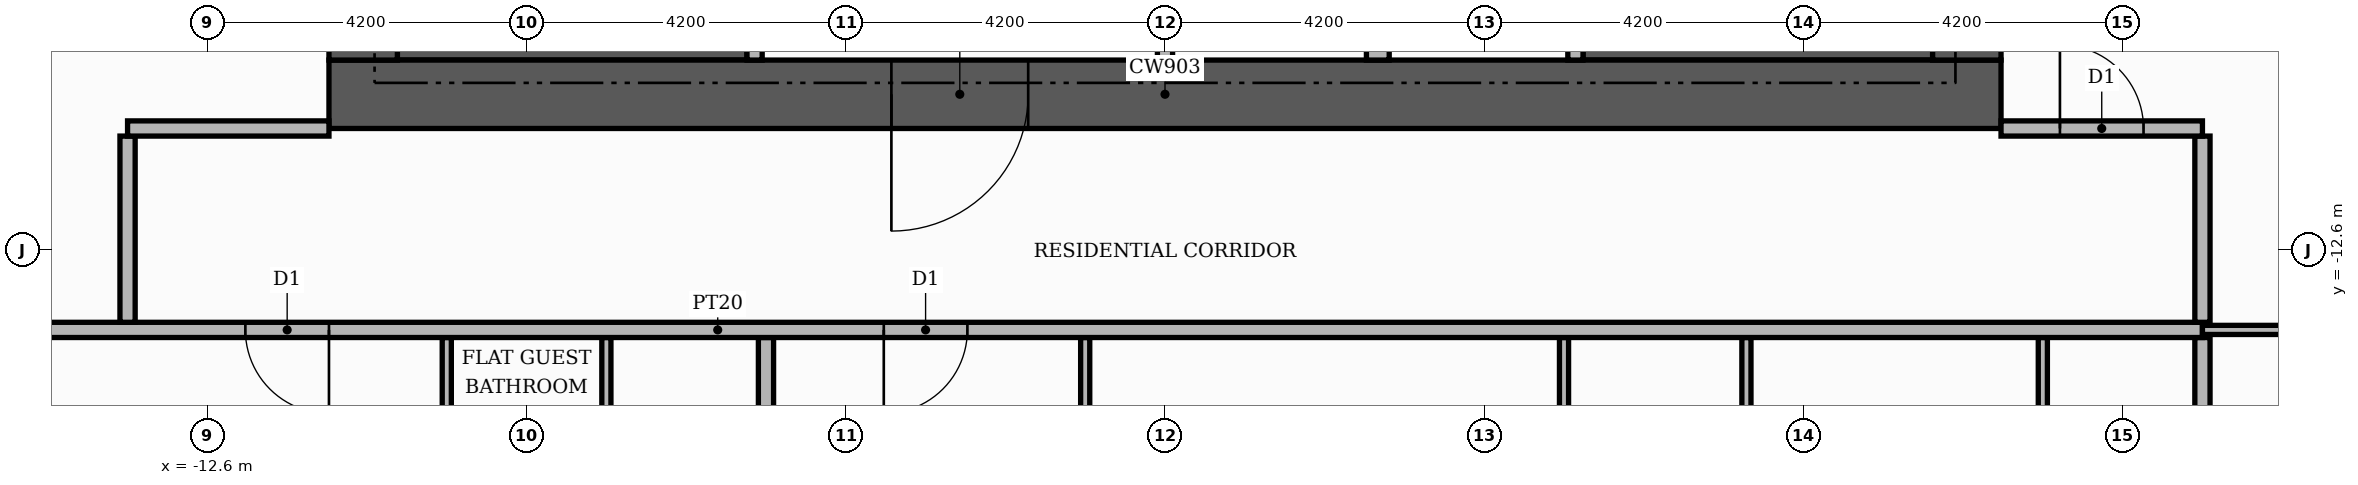
"""IFC4 building model, lengths in metres.
Left out: names, types, materials, properties, quantities, classifications, styles, units other than length and angle.
Written with IfcOpenShell. Run it as: python <this file> out.ifc"""

import sys

from ifc_helpers import new_model, si_unit, direction, frame, frame_2d, origin, place, context, subcontext, project, spatial, rectangle, extrude, element, fill, save


model = new_model("IFC4")
c1 = context("Model", 3, precision=1e-05, world=origin(), true_north=direction((0.0, 1.0)))
c2 = subcontext(c1, "Body", "Model", "MODEL_VIEW")
j1 = project(units=[si_unit("LENGTHUNIT", "METRE"), si_unit("PLANEANGLEUNIT", "RADIAN")], contexts=[c1])
p1 = place(None, origin())
s1 = spatial("IfcSite", under=j1, at=p1, CompositionType="ELEMENT")
p2 = place(p1, origin())
s2 = spatial("IfcBuilding", under=s1, at=p2, CompositionType="ELEMENT")
p3 = place(p2, frame((0.0, 0.0, 176.7)))
s3 = spatial("IfcBuildingStorey", under=s2, at=p3, CompositionType="ELEMENT", Elevation=176.7)
for number, where, z_axis, x_axis in (
    (1, (-10.1, -9.15, 0.0), (0.0, 0.0, 1.0), (1.0, 0.0, 0.0)),
    (2, (5.5, -9.15, 0.0), (0.0, 0.0, 1.0), (1.0, 0.0, 0.0)),
):
    element("IfcWall", number, at=place(p3, frame(where, z_axis=z_axis, x_axis=x_axis)), inside=s3, PredefinedType="SHEAR", context=c2, shape_type="SweptSolid", body=[
        extrude(rectangle(XDim=4.6, YDim=1.9, at=frame_2d((2.3, 0.0))), origin(), (0.0, 0.0, 1.0), 3.4),
    ])
p4 = place(p3, frame((-11.0, -10.55, 0.0), z_axis=(0.0, 0.0, 1.0), x_axis=(1.0, 0.0, 0.0)))
e3 = element("IfcWall", 3, at=p4, inside=s3, PredefinedType="SHEAR", context=c2, shape_type="SweptSolid", body=[
    extrude(rectangle(XDim=22.0, YDim=0.9, at=frame_2d((11.0, 0.0))), origin(), (0.0, 0.0, 1.0), 3.4),
])
p5 = place(p4, frame((7.4, 0.0, 0.0)))
e4 = element("IfcOpeningElement", 4, at=p5, cuts=e3, PredefinedType="OPENING", context=c2, shape_type="SweptSolid", body=[
    extrude(rectangle(XDim=1.8, YDim=2.2, at=frame_2d((0.9, 1.1))), frame((0.0, 0.46, 0.0), z_axis=(0.0, -1.0, 0.0), x_axis=(1.0, 0.0, 0.0)), (0.0, 0.0, 1.0), 0.92),
])
for number, where, z_axis, x_axis in (
    (5, (-10.55, -10.1, 0.0), (0.0, 0.0, 1.0), (0.0, 1.0, 0.0)),
    (6, (10.55, -10.1, 0.0), (0.0, 0.0, 1.0), (0.0, 1.0, 0.0)),
):
    element("IfcWall", number, at=place(p3, frame(where, z_axis=z_axis, x_axis=x_axis)), inside=s3, PredefinedType="SHEAR", context=c2, shape_type="SweptSolid", body=[
        extrude(rectangle(XDim=20.2, YDim=0.9, at=frame_2d((10.1, 0.0))), origin(), (0.0, 0.0, 1.0), 3.4),
    ])
p6 = place(p3, frame((-5.4, -10.1, 0.0), z_axis=(0.0, 0.0, 1.0), x_axis=(0.0, 1.0, 0.0)))
e7 = element("IfcWall", 7, at=p6, inside=s3, PredefinedType="PARTITIONING", context=c2, shape_type="SweptSolid", body=[
    extrude(rectangle(XDim=4.6, YDim=0.2, at=frame_2d((2.3, 0.0))), origin(), (0.0, 0.0, 1.0), 3.4),
])
p7 = place(p6, frame((2.9, 0.0, 0.0)))
e8 = element("IfcOpeningElement", 8, at=p7, cuts=e7, PredefinedType="OPENING", context=c2, shape_type="SweptSolid", body=[
    extrude(rectangle(XDim=1.0, YDim=2.1, at=frame_2d((0.5, 1.05))), frame((0.0, 0.11, 0.0), z_axis=(0.0, -1.0, 0.0), x_axis=(1.0, 0.0, 0.0)), (0.0, 0.0, 1.0), 0.22),
])
p8 = place(p3, frame((0.0, -10.1, 0.0), z_axis=(0.0, 0.0, 1.0), x_axis=(0.0, 1.0, 0.0)))
e9 = element("IfcWall", 9, at=p8, inside=s3, PredefinedType="PARTITIONING", context=c2, shape_type="SweptSolid", body=[
    extrude(rectangle(XDim=2.2, YDim=0.2, at=frame_2d((1.1, 0.0))), origin(), (0.0, 0.0, 1.0), 3.4),
])
p9 = place(p3, frame((2.8, -10.1, 0.0), z_axis=(0.0, 0.0, 1.0), x_axis=(0.0, 1.0, 0.0)))
e10 = element("IfcWall", 10, at=p9, inside=s3, PredefinedType="PARTITIONING", context=c2, shape_type="SweptSolid", body=[
    extrude(rectangle(XDim=2.2, YDim=0.3, at=frame_2d((1.1, 0.0))), origin(), (0.0, 0.0, 1.0), 3.4),
])
p10 = place(p3, frame((5.4, -10.1, 0.0), z_axis=(0.0, 0.0, 1.0), x_axis=(0.0, 1.0, 0.0)))
e11 = element("IfcWall", 11, at=p10, inside=s3, PredefinedType="PARTITIONING", context=c2, shape_type="SweptSolid", body=[
    extrude(rectangle(XDim=4.6, YDim=0.2, at=frame_2d((2.3, 0.0))), origin(), (0.0, 0.0, 1.0), 3.4),
])
p11 = place(p10, frame((2.9, 0.0, 0.0)))
e12 = element("IfcOpeningElement", 12, at=p11, cuts=e11, PredefinedType="OPENING", context=c2, shape_type="SweptSolid", body=[
    extrude(rectangle(XDim=1.0, YDim=2.1, at=frame_2d((0.5, 1.05))), frame((0.0, 0.11, 0.0), z_axis=(0.0, -1.0, 0.0), x_axis=(1.0, 0.0, 0.0)), (0.0, 0.0, 1.0), 0.22),
])
for number, where, z_axis, x_axis in (
    (13, (-5.25, -25.42, 0.0), (0.0, 0.0, 1.0), (0.0, 1.0, 0.0)),
    (14, (13.65, -25.42, 0.0), (0.0, 0.0, 1.0), (0.0, 1.0, 0.0)),
):
    element("IfcWall", number, at=place(p3, frame(where, z_axis=z_axis, x_axis=x_axis)), inside=s3, PredefinedType="PARTITIONING", context=c2, shape_type="SweptSolid", body=[
        extrude(rectangle(XDim=11.67, YDim=0.2, at=frame_2d((5.835, 0.0))), origin(), (0.0, 0.0, 1.0), 3.4),
    ])
for number, where, z_axis, x_axis in (
    (15, (-1.05, -18.86, 0.0), (0.0, 0.0, 1.0), (0.0, 1.0, 0.0)),
    (16, (5.25, -18.86, 0.0), (0.0, 0.0, 1.0), (0.0, 1.0, 0.0)),
    (17, (7.65, -18.86, 0.0), (0.0, 0.0, 1.0), (0.0, 1.0, 0.0)),
    (18, (11.55, -18.86, 0.0), (0.0, 0.0, 1.0), (0.0, 1.0, 0.0)),
):
    element("IfcWall", number, at=place(p3, frame(where, z_axis=z_axis, x_axis=x_axis)), inside=s3, PredefinedType="PARTITIONING", context=c2, shape_type="SweptSolid", body=[
        extrude(rectangle(XDim=5.11, YDim=0.12, at=frame_2d((2.555, 0.0))), origin(), (0.0, 0.0, 1.0), 3.4),
    ])
p12 = place(p3, frame((-9.45, -18.56, 0.0), z_axis=(0.0, 0.0, 1.0), x_axis=(0.0, 1.0, 0.0)))
e19 = element("IfcWall", 19, at=p12, inside=s3, PredefinedType="PARTITIONING", context=c2, shape_type="SweptSolid", body=[
    extrude(rectangle(XDim=4.81, YDim=0.12, at=frame_2d((2.405, 0.0))), origin(), (0.0, 0.0, 1.0), 3.4),
])
p13 = place(p12, frame((1.975, 0.0, 0.0)))
e20 = element("IfcOpeningElement", 20, at=p13, cuts=e19, PredefinedType="OPENING", context=c2, shape_type="SweptSolid", body=[
    extrude(rectangle(XDim=0.9, YDim=2.1, at=frame_2d((0.45, 1.05))), frame((0.0, 0.07, 0.0), z_axis=(0.0, -1.0, 0.0), x_axis=(1.0, 0.0, 0.0)), (0.0, 0.0, 1.0), 0.14),
])
p14 = place(p3, frame((-7.35, -18.56, 0.0), z_axis=(0.0, 0.0, 1.0), x_axis=(0.0, 1.0, 0.0)))
e21 = element("IfcWall", 21, at=p14, inside=s3, PredefinedType="PARTITIONING", context=c2, shape_type="SweptSolid", body=[
    extrude(rectangle(XDim=4.81, YDim=0.12, at=frame_2d((2.405, 0.0))), origin(), (0.0, 0.0, 1.0), 3.4),
])
p15 = place(p3, frame((-25.42, -13.65, 0.0), z_axis=(0.0, 0.0, 1.0), x_axis=(1.0, 0.0, 0.0)))
e22 = element("IfcWall", 22, at=p15, inside=s3, PredefinedType="PARTITIONING", context=c2, shape_type="SweptSolid", body=[
    extrude(rectangle(XDim=39.07, YDim=0.2, at=frame_2d((19.535, 0.0))), origin(), (0.0, 0.0, 1.0), 3.4),
])
p16 = place(p15, frame((13.32, 0.0, 0.0)))
e23 = element("IfcOpeningElement", 23, at=p16, cuts=e22, PredefinedType="OPENING", context=c2, shape_type="SweptSolid", body=[
    extrude(rectangle(XDim=1.1, YDim=2.4, at=frame_2d((0.55, 1.2))), frame((0.0, 0.11, 0.0), z_axis=(0.0, -1.0, 0.0), x_axis=(1.0, 0.0, 0.0)), (0.0, 0.0, 1.0), 0.22),
])
p17 = place(p15, frame((21.72, 0.0, 0.0)))
e24 = element("IfcOpeningElement", 24, at=p17, cuts=e22, PredefinedType="OPENING", context=c2, shape_type="SweptSolid", body=[
    extrude(rectangle(XDim=1.1, YDim=2.4, at=frame_2d((0.55, 1.2))), frame((0.0, 0.11, 0.0), z_axis=(0.0, -1.0, 0.0), x_axis=(1.0, 0.0, 0.0)), (0.0, 0.0, 1.0), 0.22),
])
p18 = place(p3, frame((13.65, -13.65, 0.0), z_axis=(0.0, 0.0, 1.0), x_axis=(1.0, 0.0, 0.0)))
e25 = element("IfcWall", 25, at=p18, inside=s3, PredefinedType="PARTITIONING", context=c2, shape_type="SweptSolid", body=[
    extrude(rectangle(XDim=6.47, YDim=0.12, at=frame_2d((3.235, 0.0))), origin(), (0.0, 0.0, 1.0), 3.4),
])
p19 = place(p18, frame((2.785, 0.0, 0.0)))
e26 = element("IfcOpeningElement", 26, at=p19, cuts=e25, PredefinedType="OPENING", context=c2, shape_type="SweptSolid", body=[
    extrude(rectangle(XDim=0.9, YDim=2.1, at=frame_2d((0.45, 1.05))), frame((0.0, 0.07, 0.0), z_axis=(0.0, -1.0, 0.0), x_axis=(1.0, 0.0, 0.0)), (0.0, 0.0, 1.0), 0.14),
])
for number, where, z_axis, x_axis in (
    (27, (-13.65, -13.55, 0.0), (0.0, 0.0, 1.0), (0.0, 1.0, 0.0)),
    (28, (13.65, -13.55, 0.0), (0.0, 0.0, 1.0), (0.0, 1.0, 0.0)),
):
    element("IfcWall", number, at=place(p3, frame(where, z_axis=z_axis, x_axis=x_axis)), inside=s3, PredefinedType="PARTITIONING", context=c2, shape_type="SweptSolid", body=[
        extrude(rectangle(XDim=2.45, YDim=0.2, at=frame_2d((1.225, 0.0))), origin(), (0.0, 0.0, 1.0), 3.4),
    ])
p20 = place(p3, frame((-13.65, -11.0, 0.0), z_axis=(0.0, 0.0, 1.0), x_axis=(1.0, 0.0, 0.0)))
e29 = element("IfcWall", 29, at=p20, inside=s3, PredefinedType="PARTITIONING", context=c2, shape_type="SweptSolid", body=[
    extrude(rectangle(XDim=2.65, YDim=0.2, at=frame_2d((1.325, 0.0))), origin(), (0.0, 0.0, 1.0), 3.4),
])
p21 = place(p3, frame((11.0, -11.0, 0.0), z_axis=(0.0, 0.0, 1.0), x_axis=(1.0, 0.0, 0.0)))
e30 = element("IfcWall", 30, at=p21, inside=s3, PredefinedType="PARTITIONING", context=c2, shape_type="SweptSolid", body=[
    extrude(rectangle(XDim=2.65, YDim=0.2, at=frame_2d((1.325, 0.0))), origin(), (0.0, 0.0, 1.0), 3.4),
])
p22 = place(p21, frame((0.775, 0.0, 0.0)))
e31 = element("IfcOpeningElement", 31, at=p22, cuts=e30, PredefinedType="OPENING", context=c2, shape_type="SweptSolid", body=[
    extrude(rectangle(XDim=1.1, YDim=2.4, at=frame_2d((0.55, 1.2))), frame((0.0, 0.11, 0.0), z_axis=(0.0, -1.0, 0.0), x_axis=(1.0, 0.0, 0.0)), (0.0, 0.0, 1.0), 0.22),
])
p23 = place(p5, frame((1.8, 0.0, 0.0), z_axis=(0.0, 0.0, 1.0), x_axis=(-1.0, 0.0, 0.0)))
e32 = element("IfcDoor", 32, at=p23, inside=s3, OperationType="DOUBLE_DOOR_SINGLE_SWING", PredefinedType="DOOR", context=c2, shape_type="SweptSolid", body=[
    extrude(rectangle(XDim=1.8, YDim=2.2, at=frame_2d((0.9, 1.1))), frame((0.0, 0.025, 0.0), z_axis=(0.0, -1.0, 0.0), x_axis=(1.0, 0.0, 0.0)), (0.0, 0.0, 1.0), 0.05),
])
fill(e4, e32)
p24 = place(p16, frame((1.1, 0.0, 0.0), z_axis=(0.0, 0.0, 1.0), x_axis=(-1.0, 0.0, 0.0)))
e33 = element("IfcDoor", 33, at=p24, inside=s3, OperationType="SINGLE_SWING_RIGHT", PredefinedType="DOOR", context=c2, shape_type="SweptSolid", body=[
    extrude(rectangle(XDim=1.1, YDim=2.4, at=frame_2d((0.55, 1.2))), frame((0.0, 0.025, 0.0), z_axis=(0.0, -1.0, 0.0), x_axis=(1.0, 0.0, 0.0)), (0.0, 0.0, 1.0), 0.05),
])
fill(e23, e33)
p25 = place(p17, frame((1.1, 0.0, 0.0), z_axis=(0.0, 0.0, 1.0), x_axis=(-1.0, 0.0, 0.0)))
e34 = element("IfcDoor", 34, at=p25, inside=s3, OperationType="SINGLE_SWING_LEFT", PredefinedType="DOOR", context=c2, shape_type="SweptSolid", body=[
    extrude(rectangle(XDim=1.1, YDim=2.4, at=frame_2d((0.55, 1.2))), frame((0.0, 0.025, 0.0), z_axis=(0.0, -1.0, 0.0), x_axis=(1.0, 0.0, 0.0)), (0.0, 0.0, 1.0), 0.05),
])
fill(e24, e34)
p26 = place(p22, origin())
e35 = element("IfcDoor", 35, at=p26, inside=s3, OperationType="SINGLE_SWING_LEFT", PredefinedType="DOOR", context=c2, shape_type="SweptSolid", body=[
    extrude(rectangle(XDim=1.1, YDim=2.4, at=frame_2d((0.55, 1.2))), frame((0.0, 0.025, 0.0), z_axis=(0.0, -1.0, 0.0), x_axis=(1.0, 0.0, 0.0)), (0.0, 0.0, 1.0), 0.05),
])
fill(e31, e35)
save(model, sys.argv[1])
